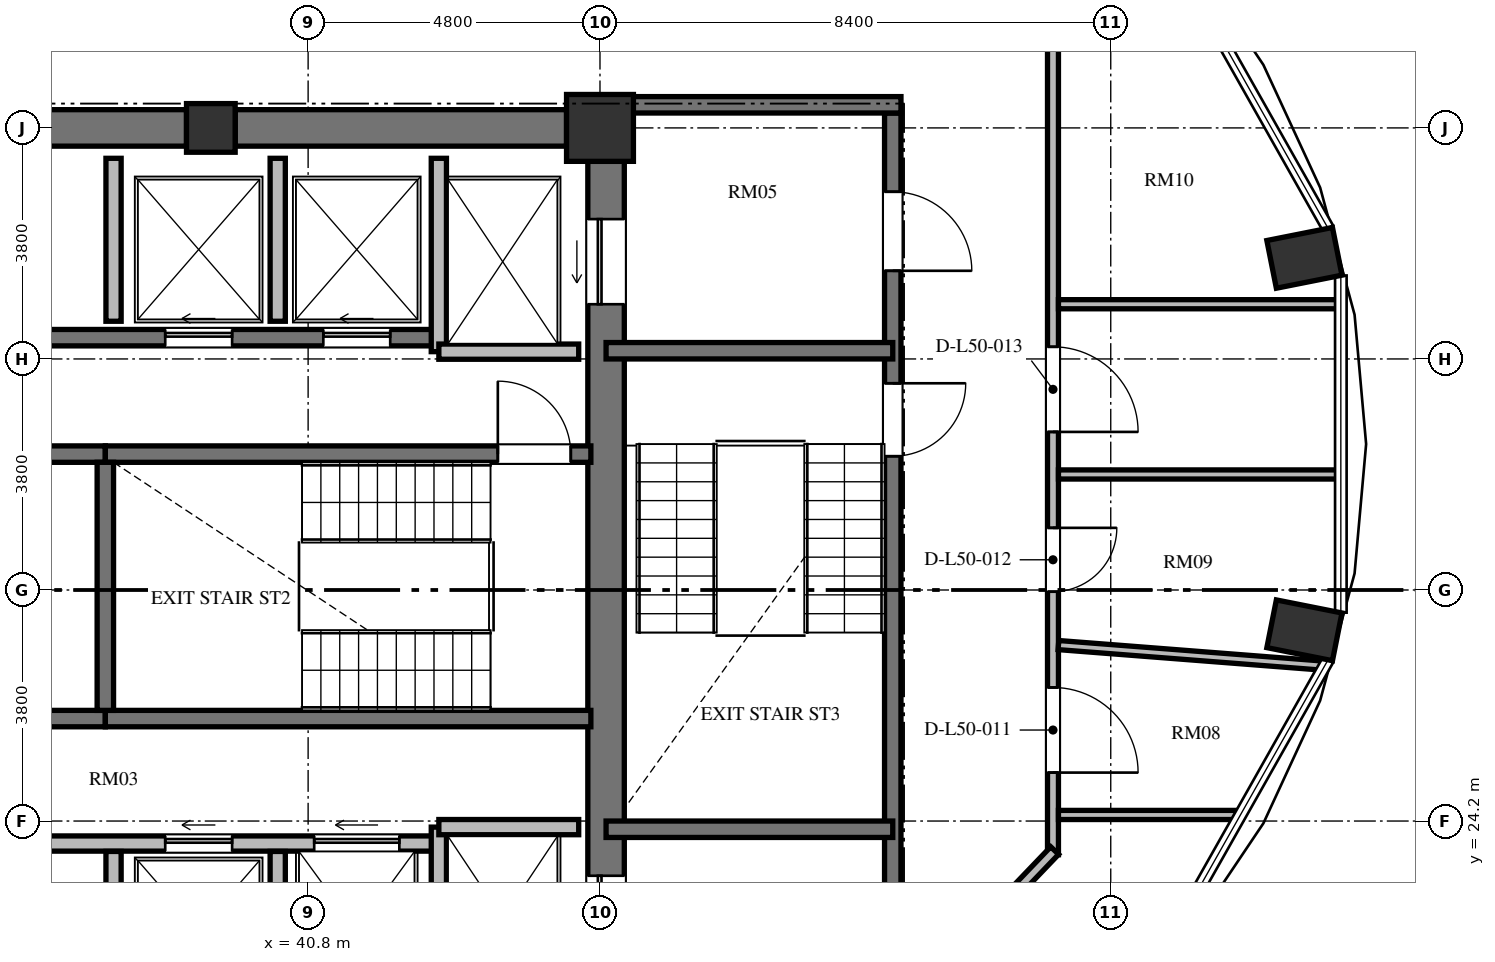
"""IFC4 building model, lengths in metres.
Left out: names, types, materials, properties, quantities, classifications, styles, units other than length and angle.
Written with IfcOpenShell. Run it as: python <this file> out.ifc"""

import sys

from ifc_helpers import new_model, si_unit, direction, frame, frame_2d, origin, origin_2d, place, context, subcontext, project, spatial, rectangle, extrude, element, fill, save


model = new_model("IFC4")
c1 = context("Model", 3, precision=1e-05, world=origin(), true_north=direction((0.0, 1.0)))
c2 = subcontext(c1, "Body", "Model", "MODEL_VIEW")
j1 = project(units=[si_unit("LENGTHUNIT", "METRE"), si_unit("PLANEANGLEUNIT", "RADIAN")], contexts=[c1])
p1 = place(None, origin())
s1 = spatial("IfcSite", under=j1, at=p1, CompositionType="ELEMENT")
p2 = place(p1, origin())
s2 = spatial("IfcBuilding", under=s1, at=p2, CompositionType="ELEMENT")
p3 = place(p2, frame((0.0, 0.0, 194.832)))
s3 = spatial("IfcBuildingStorey", under=s2, at=p3, CompositionType="ELEMENT", Elevation=194.832)
for number, where, z_axis, x_axis in (
    (1, (57.185, 27.337, 0.0), (0.0, 0.0, 1.0), (0.981, -0.195, 0.0)),
    (2, (57.185, 33.463, 0.0), (0.0, 0.0, 1.0), (0.981, 0.195, 0.0)),
):
    element("IfcColumn", number, at=place(p3, frame(where, z_axis=z_axis, x_axis=x_axis)), inside=s3, PredefinedType="COLUMN", context=c2, shape_type="SweptSolid", body=[
        extrude(rectangle(XDim=1.1, YDim=0.8, at=origin_2d()), origin(), (0.0, 0.0, 1.0), 3.648),
    ])
p4 = place(p3, frame((45.6, 35.6, 0.0), z_axis=(0.0, 0.0, 1.0), x_axis=(1.0, 0.0, 0.0)))
e3 = element("IfcColumn", 3, at=p4, inside=s3, PredefinedType="COLUMN", context=c2, shape_type="SweptSolid", body=[
    extrude(rectangle(XDim=1.1, YDim=1.1, at=origin_2d()), origin(), (0.0, 0.0, 1.0), 3.648),
])
p5 = place(p3, frame((39.2, 35.6, 0.0), z_axis=(0.0, 0.0, 1.0), x_axis=(1.0, 0.0, 0.0)))
e4 = element("IfcColumn", 4, at=p5, inside=s3, PredefinedType="COLUMN", context=c2, shape_type="SweptSolid", body=[
    extrude(rectangle(XDim=0.8, YDim=0.8, at=origin_2d()), origin(), (0.0, 0.0, 1.0), 3.648),
])
p6 = place(p3, frame((45.7, 20.95, 0.0), z_axis=(0.0, 0.0, 1.0), x_axis=(0.0, 1.0, 0.0)))
e5 = element("IfcWall", 5, at=p6, inside=s3, PredefinedType="SHEAR", context=c2, shape_type="SweptSolid", body=[
    extrude(rectangle(XDim=14.1, YDim=0.6, at=frame_2d((7.05, 0.0))), origin(), (0.0, 0.0, 1.0), 3.648),
])
p7 = place(p6, frame((11.75, 0.0, 0.0)))
e6 = element("IfcOpeningElement", 6, at=p7, cuts=e5, PredefinedType="OPENING", context=c2, shape_type="SweptSolid", body=[
    extrude(rectangle(XDim=1.4, YDim=2.3, at=frame_2d((0.7, 1.15))), frame((0.0, 0.31, 0.0), z_axis=(0.0, -1.0, 0.0), x_axis=(1.0, 0.0, 0.0)), (0.0, 0.0, 1.0), 0.62),
])
p8 = place(p6, frame((0.95, 0.0, 0.0)))
e7 = element("IfcOpeningElement", 7, at=p8, cuts=e5, PredefinedType="OPENING", context=c2, shape_type="SweptSolid", body=[
    extrude(rectangle(XDim=1.4, YDim=2.3, at=frame_2d((0.7, 1.15))), frame((0.0, 0.31, 0.0), z_axis=(0.0, -1.0, 0.0), x_axis=(1.0, 0.0, 0.0)), (0.0, 0.0, 1.0), 0.62),
])
p9 = place(p3, frame((33.2, 35.6, 0.0), z_axis=(0.0, 0.0, 1.0), x_axis=(1.0, 0.0, 0.0)))
e8 = element("IfcWall", 8, at=p9, inside=s3, PredefinedType="SHEAR", context=c2, shape_type="SweptSolid", body=[
    extrude(rectangle(XDim=5.6, YDim=0.6, at=frame_2d((2.8, 0.0))), origin(), (0.0, 0.0, 1.0), 3.648),
])
p10 = place(p3, frame((39.6, 35.6, 0.0), z_axis=(0.0, 0.0, 1.0), x_axis=(1.0, 0.0, 0.0)))
e9 = element("IfcWall", 9, at=p10, inside=s3, PredefinedType="SHEAR", context=c2, shape_type="SweptSolid", body=[
    extrude(rectangle(XDim=5.45, YDim=0.6, at=frame_2d((2.725, 0.0))), origin(), (0.0, 0.0, 1.0), 3.648),
])
p11 = place(p3, frame((34.535, 30.235, 0.0), z_axis=(0.0, 0.0, 1.0), x_axis=(1.0, 0.0, 0.0)))
e10 = element("IfcWall", 10, at=p11, inside=s3, PredefinedType="SHEAR", context=c2, shape_type="SweptSolid", body=[
    extrude(rectangle(XDim=2.93, YDim=0.27, at=frame_2d((1.465, 0.0))), origin(), (0.0, 0.0, 1.0), 3.648),
])
p12 = place(p11, frame((0.965, 0.0, 0.0)))
e11 = element("IfcOpeningElement", 11, at=p12, cuts=e10, PredefinedType="OPENING", context=c2, shape_type="SweptSolid", body=[
    extrude(rectangle(XDim=1.0, YDim=2.1, at=frame_2d((0.5, 1.05))), frame((0.0, 0.145, 0.0), z_axis=(0.0, -1.0, 0.0), x_axis=(1.0, 0.0, 0.0)), (0.0, 0.0, 1.0), 0.29),
])
p13 = place(p3, frame((37.465, 30.235, 0.0), z_axis=(0.0, 0.0, 1.0), x_axis=(1.0, 0.0, 0.0)))
e12 = element("IfcWall", 12, at=p13, inside=s3, PredefinedType="SHEAR", context=c2, shape_type="SweptSolid", body=[
    extrude(rectangle(XDim=7.985, YDim=0.27, at=frame_2d((3.992, 0.0))), origin(), (0.0, 0.0, 1.0), 3.648),
])
p14 = place(p13, frame((6.455, 0.0, 0.0)))
e13 = element("IfcOpeningElement", 13, at=p14, cuts=e12, PredefinedType="OPENING", context=c2, shape_type="SweptSolid", body=[
    extrude(rectangle(XDim=1.2, YDim=2.15, at=frame_2d((0.6, 1.075))), frame((0.0, 0.145, 0.0), z_axis=(0.0, -1.0, 0.0), x_axis=(1.0, 0.0, 0.0)), (0.0, 0.0, 1.0), 0.29),
])
p15 = place(p3, frame((34.535, 25.885, 0.0), z_axis=(0.0, 0.0, 1.0), x_axis=(1.0, 0.0, 0.0)))
e14 = element("IfcWall", 14, at=p15, inside=s3, PredefinedType="SHEAR", context=c2, shape_type="SweptSolid", body=[
    extrude(rectangle(XDim=2.93, YDim=0.27, at=frame_2d((1.465, 0.0))), origin(), (0.0, 0.0, 1.0), 3.648),
])
p16 = place(p3, frame((37.465, 25.885, 0.0), z_axis=(0.0, 0.0, 1.0), x_axis=(1.0, 0.0, 0.0)))
e15 = element("IfcWall", 15, at=p16, inside=s3, PredefinedType="SHEAR", context=c2, shape_type="SweptSolid", body=[
    extrude(rectangle(XDim=7.985, YDim=0.27, at=frame_2d((3.992, 0.0))), origin(), (0.0, 0.0, 1.0), 3.648),
])
p17 = place(p3, frame((37.465, 26.02, 0.0), z_axis=(0.0, 0.0, 1.0), x_axis=(0.0, 1.0, 0.0)))
e16 = element("IfcWall", 16, at=p17, inside=s3, PredefinedType="SHEAR", context=c2, shape_type="SweptSolid", body=[
    extrude(rectangle(XDim=4.08, YDim=0.27, at=frame_2d((2.04, 0.0))), origin(), (0.0, 0.0, 1.0), 3.648),
])
p18 = place(p3, frame((26.55, 32.15, 0.0), z_axis=(0.0, 0.0, 1.0), x_axis=(1.0, 0.0, 0.0)))
e17 = element("IfcWall", 17, at=p18, inside=s3, PredefinedType="SHEAR", context=c2, shape_type="SweptSolid", body=[
    extrude(rectangle(XDim=16.4, YDim=0.27, at=frame_2d((8.2, 0.0))), origin(), (0.0, 0.0, 1.0), 3.648),
])
p19 = place(p18, frame((5.125, 0.0, 0.0)))
e18 = element("IfcOpeningElement", 18, at=p19, cuts=e17, PredefinedType="OPENING", context=c2, shape_type="SweptSolid", body=[
    extrude(rectangle(XDim=1.05, YDim=2.15, at=frame_2d((0.525, 1.075))), frame((0.0, 0.145, 0.0), z_axis=(0.0, -1.0, 0.0), x_axis=(1.0, 0.0, 0.0)), (0.0, 0.0, 1.0), 0.29),
])
p20 = place(p18, frame((11.9, 0.0, 0.0)))
e19 = element("IfcOpeningElement", 19, at=p20, cuts=e17, PredefinedType="OPENING", context=c2, shape_type="SweptSolid", body=[
    extrude(rectangle(XDim=1.1, YDim=2.2, at=frame_2d((0.55, 1.1))), frame((0.0, 0.145, 0.0), z_axis=(0.0, -1.0, 0.0), x_axis=(1.0, 0.0, 0.0)), (0.0, 0.0, 1.0), 0.29),
])
p21 = place(p18, frame((14.5, 0.0, 0.0)))
e20 = element("IfcOpeningElement", 20, at=p21, cuts=e17, PredefinedType="OPENING", context=c2, shape_type="SweptSolid", body=[
    extrude(rectangle(XDim=1.1, YDim=2.2, at=frame_2d((0.55, 1.1))), frame((0.0, 0.145, 0.0), z_axis=(0.0, -1.0, 0.0), x_axis=(1.0, 0.0, 0.0)), (0.0, 0.0, 1.0), 0.29),
])
p22 = place(p3, frame((26.75, 23.83, 0.0), z_axis=(0.0, 0.0, 1.0), x_axis=(1.0, 0.0, 0.0)))
e21 = element("IfcWall", 21, at=p22, inside=s3, PredefinedType="SOLIDWALL", context=c2, shape_type="SweptSolid", body=[
    extrude(rectangle(XDim=16.2, YDim=0.25, at=frame_2d((8.1, 0.0))), origin(), (0.0, 0.0, 1.0), 3.448),
])
p23 = place(p22, frame((4.75, 0.0, 0.0)))
e22 = element("IfcOpeningElement", 22, at=p23, cuts=e21, PredefinedType="OPENING", context=c2, shape_type="SweptSolid", body=[
    extrude(rectangle(XDim=1.4, YDim=2.2, at=frame_2d((0.7, 1.1))), frame((0.0, 0.135, 0.0), z_axis=(0.0, -1.0, 0.0), x_axis=(1.0, 0.0, 0.0)), (0.0, 0.0, 1.0), 0.27),
])
p24 = place(p22, frame((11.7, 0.0, 0.0)))
e23 = element("IfcOpeningElement", 23, at=p24, cuts=e21, PredefinedType="OPENING", context=c2, shape_type="SweptSolid", body=[
    extrude(rectangle(XDim=1.1, YDim=2.2, at=frame_2d((0.55, 1.1))), frame((0.0, 0.135, 0.0), z_axis=(0.0, -1.0, 0.0), x_axis=(1.0, 0.0, 0.0)), (0.0, 0.0, 1.0), 0.27),
])
p25 = place(p22, frame((14.15, 0.0, 0.0)))
e24 = element("IfcOpeningElement", 24, at=p25, cuts=e21, PredefinedType="OPENING", context=c2, shape_type="SweptSolid", body=[
    extrude(rectangle(XDim=1.4, YDim=2.3, at=frame_2d((0.7, 1.15))), frame((0.0, 0.135, 0.0), z_axis=(0.0, -1.0, 0.0), x_axis=(1.0, 0.0, 0.0)), (0.0, 0.0, 1.0), 0.27),
])
p26 = place(p3, frame((42.95, 31.92, 0.0), z_axis=(0.0, 0.0, 1.0), x_axis=(0.0, 1.0, 0.0)))
e25 = element("IfcWall", 25, at=p26, inside=s3, PredefinedType="SOLIDWALL", context=c2, shape_type="SweptSolid", body=[
    extrude(rectangle(XDim=3.18, YDim=0.25, at=frame_2d((1.59, 0.0))), origin(), (0.0, 0.0, 1.0), 3.448),
])
p27 = place(p3, frame((42.95, 31.92, 0.0), z_axis=(0.0, 0.0, 1.0), x_axis=(1.0, 0.0, 0.0)))
e26 = element("IfcWall", 26, at=p27, inside=s3, PredefinedType="SOLIDWALL", context=c2, shape_type="SweptSolid", body=[
    extrude(rectangle(XDim=2.3, YDim=0.25, at=frame_2d((1.15, 0.0))), origin(), (0.0, 0.0, 1.0), 3.448),
])
p28 = place(p3, frame((42.95, 20.9, 0.0), z_axis=(0.0, 0.0, 1.0), x_axis=(0.0, 1.0, 0.0)))
e27 = element("IfcWall", 27, at=p28, inside=s3, PredefinedType="SOLIDWALL", context=c2, shape_type="SweptSolid", body=[
    extrude(rectangle(XDim=3.2, YDim=0.25, at=frame_2d((1.6, 0.0))), origin(), (0.0, 0.0, 1.0), 3.448),
])
p29 = place(p3, frame((42.95, 24.1, 0.0), z_axis=(0.0, 0.0, 1.0), x_axis=(1.0, 0.0, 0.0)))
e28 = element("IfcWall", 28, at=p29, inside=s3, PredefinedType="SOLIDWALL", context=c2, shape_type="SweptSolid", body=[
    extrude(rectangle(XDim=2.3, YDim=0.25, at=frame_2d((1.15, 0.0))), origin(), (0.0, 0.0, 1.0), 3.448),
])
p30 = place(p3, frame((37.6, 32.42, 0.0), z_axis=(0.0, 0.0, 1.0), x_axis=(0.0, 1.0, 0.0)))
e29 = element("IfcWall", 29, at=p30, inside=s3, PredefinedType="SOLIDWALL", context=c2, shape_type="SweptSolid", body=[
    extrude(rectangle(XDim=2.68, YDim=0.25, at=frame_2d((1.34, 0.0))), origin(), (0.0, 0.0, 1.0), 3.448),
])
p31 = place(p3, frame((37.6, 20.9, 0.0), z_axis=(0.0, 0.0, 1.0), x_axis=(0.0, 1.0, 0.0)))
e30 = element("IfcWall", 30, at=p31, inside=s3, PredefinedType="SOLIDWALL", context=c2, shape_type="SweptSolid", body=[
    extrude(rectangle(XDim=2.8, YDim=0.25, at=frame_2d((1.4, 0.0))), origin(), (0.0, 0.0, 1.0), 3.448),
])
p32 = place(p3, frame((40.3, 32.42, 0.0), z_axis=(0.0, 0.0, 1.0), x_axis=(0.0, 1.0, 0.0)))
e31 = element("IfcWall", 31, at=p32, inside=s3, PredefinedType="SOLIDWALL", context=c2, shape_type="SweptSolid", body=[
    extrude(rectangle(XDim=2.68, YDim=0.25, at=frame_2d((1.34, 0.0))), origin(), (0.0, 0.0, 1.0), 3.448),
])
p33 = place(p3, frame((40.3, 20.9, 0.0), z_axis=(0.0, 0.0, 1.0), x_axis=(0.0, 1.0, 0.0)))
e32 = element("IfcWall", 32, at=p33, inside=s3, PredefinedType="SOLIDWALL", context=c2, shape_type="SweptSolid", body=[
    extrude(rectangle(XDim=2.8, YDim=0.25, at=frame_2d((1.4, 0.0))), origin(), (0.0, 0.0, 1.0), 3.448),
])
p34 = place(p3, frame((50.415, 35.845, 0.0), z_axis=(0.0, 0.0, 1.0), x_axis=(0.0, -1.0, 0.0)))
e33 = element("IfcWall", 33, at=p34, inside=s3, PredefinedType="SHEAR", context=c2, shape_type="SweptSolid", body=[
    extrude(rectangle(XDim=15.825, YDim=0.27, at=frame_2d((7.913, 0.0))), origin(), (0.0, 0.0, 1.0), 3.648),
])
p35 = place(p34, frame((4.445, 0.0, 0.0)))
e34 = element("IfcOpeningElement", 34, at=p35, cuts=e33, PredefinedType="OPENING", context=c2, shape_type="SweptSolid", body=[
    extrude(rectangle(XDim=1.2, YDim=2.15, at=frame_2d((0.6, 1.075))), frame((0.0, 0.145, 0.0), z_axis=(0.0, -1.0, 0.0), x_axis=(1.0, 0.0, 0.0)), (0.0, 0.0, 1.0), 0.29),
])
p36 = place(p34, frame((1.295, 0.0, 0.0)))
e35 = element("IfcOpeningElement", 35, at=p36, cuts=e33, PredefinedType="OPENING", context=c2, shape_type="SweptSolid", body=[
    extrude(rectangle(XDim=1.3, YDim=2.2, at=frame_2d((0.65, 1.1))), frame((0.0, 0.145, 0.0), z_axis=(0.0, -1.0, 0.0), x_axis=(1.0, 0.0, 0.0)), (0.0, 0.0, 1.0), 0.29),
])
p37 = place(p34, frame((13.095, 0.0, 0.0)))
e36 = element("IfcOpeningElement", 36, at=p37, cuts=e33, PredefinedType="OPENING", context=c2, shape_type="SweptSolid", body=[
    extrude(rectangle(XDim=1.3, YDim=2.2, at=frame_2d((0.65, 1.1))), frame((0.0, 0.145, 0.0), z_axis=(0.0, -1.0, 0.0), x_axis=(1.0, 0.0, 0.0)), (0.0, 0.0, 1.0), 0.29),
])
p38 = place(p3, frame((46.0, 35.98, 0.0), z_axis=(0.0, 0.0, 1.0), x_axis=(1.0, 0.0, 0.0)))
e37 = element("IfcWall", 37, at=p38, inside=s3, PredefinedType="SHEAR", context=c2, shape_type="SweptSolid", body=[
    extrude(rectangle(XDim=4.55, YDim=0.27, at=frame_2d((2.275, 0.0))), origin(), (0.0, 0.0, 1.0), 3.648),
])
for number, where, z_axis, x_axis in (
    (38, (45.7, 31.935, 0.0), (0.0, 0.0, 1.0), (1.0, 0.0, 0.0)),
    (39, (45.7, 24.065, 0.0), (0.0, 0.0, 1.0), (1.0, 0.0, 0.0)),
):
    element("IfcWall", number, at=place(p3, frame(where, z_axis=z_axis, x_axis=x_axis)), inside=s3, PredefinedType="SHEAR", context=c2, shape_type="SweptSolid", body=[
        extrude(rectangle(XDim=4.715, YDim=0.27, at=frame_2d((2.357, 0.0))), origin(), (0.0, 0.0, 1.0), 3.648),
    ])
p39 = place(p3, frame((53.05, 37.155, 0.0), z_axis=(0.0, 0.0, 1.0), x_axis=(0.0, -1.0, 0.0)))
e40 = element("IfcWall", 40, at=p39, inside=s3, PredefinedType="PARTITIONING", context=c2, shape_type="SweptSolid", body=[
    extrude(rectangle(XDim=13.509, YDim=0.18, at=frame_2d((6.754, 0.0))), origin(), (0.0, 0.0, 1.0), 3.448),
])
p40 = place(p39, frame((10.758, 0.0, 0.0)))
e41 = element("IfcOpeningElement", 41, at=p40, cuts=e40, PredefinedType="OPENING", context=c2, shape_type="SweptSolid", body=[
    extrude(rectangle(XDim=1.4, YDim=2.2, at=frame_2d((0.7, 1.1))), frame((0.0, 0.1, 0.0), z_axis=(0.0, -1.0, 0.0), x_axis=(1.0, 0.0, 0.0)), (0.0, 0.0, 1.0), 0.2),
])
p41 = place(p39, frame((8.133, 0.0, 0.0)))
e42 = element("IfcOpeningElement", 42, at=p41, cuts=e40, PredefinedType="OPENING", context=c2, shape_type="SweptSolid", body=[
    extrude(rectangle(XDim=1.05, YDim=2.15, at=frame_2d((0.525, 1.075))), frame((0.0, 0.1, 0.0), z_axis=(0.0, -1.0, 0.0), x_axis=(1.0, 0.0, 0.0)), (0.0, 0.0, 1.0), 0.2),
])
p42 = place(p39, frame((5.155, 0.0, 0.0)))
e43 = element("IfcOpeningElement", 43, at=p42, cuts=e40, PredefinedType="OPENING", context=c2, shape_type="SweptSolid", body=[
    extrude(rectangle(XDim=1.4, YDim=2.2, at=frame_2d((0.7, 1.1))), frame((0.0, 0.1, 0.0), z_axis=(0.0, -1.0, 0.0), x_axis=(1.0, 0.0, 0.0)), (0.0, 0.0, 1.0), 0.2),
])
p43 = place(p3, frame((53.078, 23.714, 0.0), z_axis=(0.0, 0.0, 1.0), x_axis=(-0.691353379446, -0.722516785085, 0.0)))
e44 = element("IfcWall", 44, at=p43, inside=s3, PredefinedType="PARTITIONING", context=c2, shape_type="SweptSolid", body=[
    extrude(rectangle(XDim=3.604, YDim=0.18, at=frame_2d((1.802, 0.0))), origin(), (0.0, 0.0, 1.0), 3.448),
])
p44 = place(p3, frame((53.14, 24.3, 0.0), z_axis=(0.0, 0.0, 1.0), x_axis=(1.0, 0.0, 0.0)))
e45 = element("IfcWall", 45, at=p44, inside=s3, PredefinedType="PARTITIONING", context=c2, shape_type="SweptSolid", body=[
    extrude(rectangle(XDim=2.982, YDim=0.15, at=frame_2d((1.491, 0.0))), origin(), (0.0, 0.0, 1.0), 3.448),
])
p45 = place(p3, frame((53.14, 27.094, 0.0), z_axis=(0.0, 0.0, 1.0), x_axis=(0.996990775312, -0.077520280847, 0.0)))
e46 = element("IfcWall", 46, at=p45, inside=s3, PredefinedType="PARTITIONING", context=c2, shape_type="SweptSolid", body=[
    extrude(rectangle(XDim=4.396, YDim=0.15, at=frame_2d((2.198, 0.0))), origin(), (0.0, 0.0, 1.0), 3.448),
])
for number, where, z_axis, x_axis in (
    (47, (53.14, 29.9, 0.0), (0.0, 0.0, 1.0), (1.0, 0.0, 0.0)),
    (48, (53.14, 32.7, 0.0), (0.0, 0.0, 1.0), (1.0, 0.0, 0.0)),
):
    element("IfcWall", number, at=place(p3, frame(where, z_axis=z_axis, x_axis=x_axis)), inside=s3, PredefinedType="PARTITIONING", context=c2, shape_type="SweptSolid", body=[
        extrude(rectangle(XDim=4.632, YDim=0.15, at=frame_2d((2.316, 0.0))), origin(), (0.0, 0.0, 1.0), 3.448),
    ])
p46 = place(p14, origin())
e49 = element("IfcDoor", 49, at=p46, inside=s3, OperationType="SINGLE_SWING_LEFT", PredefinedType="DOOR", context=c2, shape_type="SweptSolid", body=[
    extrude(rectangle(XDim=1.2, YDim=2.15, at=frame_2d((0.6, 1.075))), frame((0.0, 0.025, 0.0), z_axis=(0.0, -1.0, 0.0), x_axis=(1.0, 0.0, 0.0)), (0.0, 0.0, 1.0), 0.05),
])
fill(e13, e49)
p47 = place(p20, origin())
e50 = element("IfcDoor", 50, at=p47, inside=s3, OperationType="SLIDING_TO_LEFT", PredefinedType="DOOR", context=c2, shape_type="SweptSolid", body=[
    extrude(rectangle(XDim=1.1, YDim=2.2, at=frame_2d((0.55, 1.1))), frame((0.0, 0.025, 0.0), z_axis=(0.0, -1.0, 0.0), x_axis=(1.0, 0.0, 0.0)), (0.0, 0.0, 1.0), 0.05),
])
fill(e19, e50)
p48 = place(p21, origin())
e51 = element("IfcDoor", 51, at=p48, inside=s3, OperationType="SLIDING_TO_LEFT", PredefinedType="DOOR", context=c2, shape_type="SweptSolid", body=[
    extrude(rectangle(XDim=1.1, YDim=2.2, at=frame_2d((0.55, 1.1))), frame((0.0, 0.025, 0.0), z_axis=(0.0, -1.0, 0.0), x_axis=(1.0, 0.0, 0.0)), (0.0, 0.0, 1.0), 0.05),
])
fill(e20, e51)
p49 = place(p24, origin())
e52 = element("IfcDoor", 52, at=p49, inside=s3, OperationType="SLIDING_TO_LEFT", PredefinedType="DOOR", context=c2, shape_type="SweptSolid", body=[
    extrude(rectangle(XDim=1.1, YDim=2.2, at=frame_2d((0.55, 1.1))), frame((0.0, 0.025, 0.0), z_axis=(0.0, -1.0, 0.0), x_axis=(1.0, 0.0, 0.0)), (0.0, 0.0, 1.0), 0.05),
])
fill(e23, e52)
p50 = place(p7, origin())
e53 = element("IfcDoor", 53, at=p50, inside=s3, OperationType="SLIDING_TO_LEFT", PredefinedType="DOOR", context=c2, shape_type="SweptSolid", body=[
    extrude(rectangle(XDim=1.4, YDim=2.3, at=frame_2d((0.7, 1.15))), frame((0.0, 0.025, 0.0), z_axis=(0.0, -1.0, 0.0), x_axis=(1.0, 0.0, 0.0)), (0.0, 0.0, 1.0), 0.05),
])
fill(e6, e53)
p51 = place(p8, origin())
e54 = element("IfcDoor", 54, at=p51, inside=s3, OperationType="SLIDING_TO_LEFT", PredefinedType="DOOR", context=c2, shape_type="SweptSolid", body=[
    extrude(rectangle(XDim=1.4, YDim=2.3, at=frame_2d((0.7, 1.15))), frame((0.0, 0.025, 0.0), z_axis=(0.0, -1.0, 0.0), x_axis=(1.0, 0.0, 0.0)), (0.0, 0.0, 1.0), 0.05),
])
fill(e7, e54)
p52 = place(p25, origin())
e55 = element("IfcDoor", 55, at=p52, inside=s3, OperationType="SLIDING_TO_LEFT", PredefinedType="DOOR", context=c2, shape_type="SweptSolid", body=[
    extrude(rectangle(XDim=1.4, YDim=2.3, at=frame_2d((0.7, 1.15))), frame((0.0, 0.025, 0.0), z_axis=(0.0, -1.0, 0.0), x_axis=(1.0, 0.0, 0.0)), (0.0, 0.0, 1.0), 0.05),
])
fill(e24, e55)
p53 = place(p35, origin())
e56 = element("IfcDoor", 56, at=p53, inside=s3, OperationType="SINGLE_SWING_LEFT", PredefinedType="DOOR", context=c2, shape_type="SweptSolid", body=[
    extrude(rectangle(XDim=1.2, YDim=2.15, at=frame_2d((0.6, 1.075))), frame((0.0, 0.025, 0.0), z_axis=(0.0, -1.0, 0.0), x_axis=(1.0, 0.0, 0.0)), (0.0, 0.0, 1.0), 0.05),
])
fill(e34, e56)
p54 = place(p36, origin())
e57 = element("IfcDoor", 57, at=p54, inside=s3, OperationType="SINGLE_SWING_RIGHT", PredefinedType="DOOR", context=c2, shape_type="SweptSolid", body=[
    extrude(rectangle(XDim=1.3, YDim=2.2, at=frame_2d((0.65, 1.1))), frame((0.0, 0.025, 0.0), z_axis=(0.0, -1.0, 0.0), x_axis=(1.0, 0.0, 0.0)), (0.0, 0.0, 1.0), 0.05),
])
fill(e35, e57)
p55 = place(p40, origin())
e58 = element("IfcDoor", 58, at=p55, inside=s3, OperationType="SINGLE_SWING_RIGHT", PredefinedType="DOOR", context=c2, shape_type="SweptSolid", body=[
    extrude(rectangle(XDim=1.4, YDim=2.2, at=frame_2d((0.7, 1.1))), frame((0.0, 0.025, 0.0), z_axis=(0.0, -1.0, 0.0), x_axis=(1.0, 0.0, 0.0)), (0.0, 0.0, 1.0), 0.05),
])
fill(e41, e58)
p56 = place(p41, origin())
e59 = element("IfcDoor", 59, at=p56, inside=s3, OperationType="SINGLE_SWING_LEFT", PredefinedType="DOOR", context=c2, shape_type="SweptSolid", body=[
    extrude(rectangle(XDim=1.05, YDim=2.15, at=frame_2d((0.525, 1.075))), frame((0.0, 0.025, 0.0), z_axis=(0.0, -1.0, 0.0), x_axis=(1.0, 0.0, 0.0)), (0.0, 0.0, 1.0), 0.05),
])
fill(e42, e59)
p57 = place(p42, origin())
e60 = element("IfcDoor", 60, at=p57, inside=s3, OperationType="SINGLE_SWING_RIGHT", PredefinedType="DOOR", context=c2, shape_type="SweptSolid", body=[
    extrude(rectangle(XDim=1.4, YDim=2.2, at=frame_2d((0.7, 1.1))), frame((0.0, 0.025, 0.0), z_axis=(0.0, -1.0, 0.0), x_axis=(1.0, 0.0, 0.0)), (0.0, 0.0, 1.0), 0.05),
])
fill(e43, e60)
save(model, sys.argv[1])
